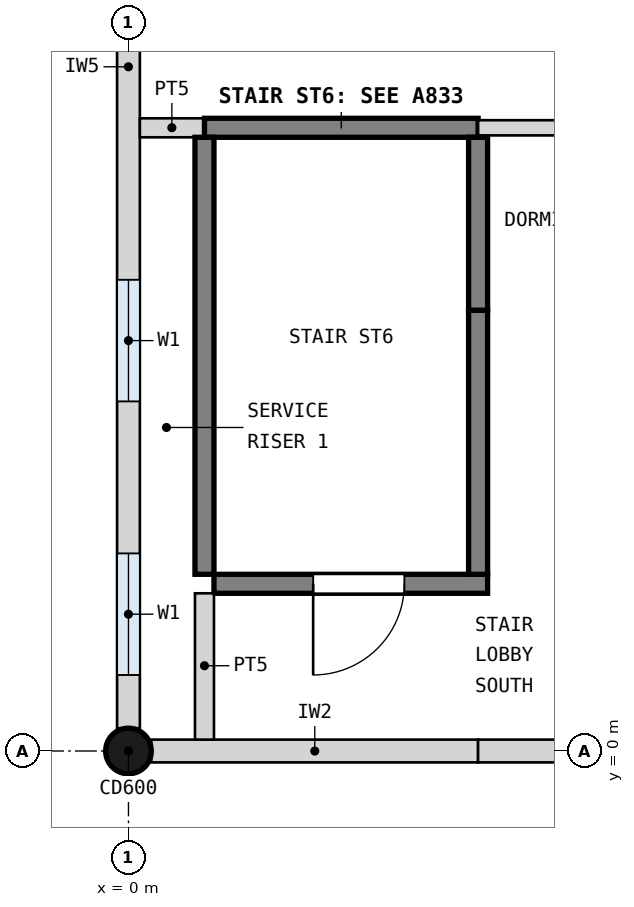
"""IFC4 building model, lengths in metres.
Left out: names, types, materials, properties, quantities, classifications, styles, units other than length and angle.
Written with IfcOpenShell. Run it as: python <this file> out.ifc"""

import sys

from ifc_helpers import new_model, si_unit, direction, frame, frame_2d, origin, origin_with_axes, origin_2d, place, context, subcontext, project, spatial, rectangle, circle, extrude, element, fill, save


model = new_model("IFC4")
c1 = context("Model", 3, precision=1e-05, world=origin(), true_north=direction((0.0, 1.0)))
c2 = subcontext(c1, "Body", "Model", "MODEL_VIEW")
j1 = project(units=[si_unit("LENGTHUNIT", "METRE"), si_unit("PLANEANGLEUNIT", "RADIAN")], contexts=[c1])
p1 = place(None, origin())
s1 = spatial("IfcSite", under=j1, at=p1, CompositionType="ELEMENT")
p2 = place(p1, origin())
s2 = spatial("IfcBuilding", under=s1, at=p2, CompositionType="ELEMENT")
p3 = place(p2, frame((0.0, 0.0, 4.2)))
s3 = spatial("IfcBuildingStorey", under=s2, at=p3, CompositionType="ELEMENT", Elevation=4.2)
p4 = place(p3, origin_with_axes())
e1 = element("IfcColumn", 1, at=p4, inside=s3, PredefinedType="COLUMN", context=c2, shape_type="SweptSolid", body=[
    extrude(circle(Radius=0.3, at=origin_2d()), origin(), (0.0, 0.0, 1.0), 4.2),
])
p5 = place(p3, frame((0.3, 0.0, 0.0), z_axis=(0.0, 0.0, 1.0), x_axis=(1.0, 0.0, 0.0)))
e2 = element("IfcWall", 2, at=p5, inside=s3, PredefinedType="SOLIDWALL", context=c2, shape_type="SweptSolid", body=[
    extrude(rectangle(XDim=4.3, YDim=0.3, at=frame_2d((2.15, 0.0))), origin(), (0.0, 0.0, 1.0), 3.0),
])
p6 = place(p3, frame((4.6, 0.0, 0.0), z_axis=(0.0, 0.0, 1.0), x_axis=(1.0, 0.0, 0.0)))
e3 = element("IfcWall", 3, at=p6, inside=s3, PredefinedType="SOLIDWALL", context=c2, shape_type="SweptSolid", body=[
    extrude(rectangle(XDim=7.9, YDim=0.3, at=frame_2d((3.95, 0.0))), origin(), (0.0, 0.0, 1.0), 3.0),
])
p7 = place(p6, frame((2.725, 0.0, 1.0)))
e4 = element("IfcOpeningElement", 4, at=p7, cuts=e3, PredefinedType="OPENING", context=c2, shape_type="SweptSolid", body=[
    extrude(rectangle(XDim=1.6, YDim=1.8, at=frame_2d((0.8, 0.9))), frame((0.0, 0.16, 0.0), z_axis=(0.0, -1.0, 0.0), x_axis=(1.0, 0.0, 0.0)), (0.0, 0.0, 1.0), 0.32),
])
p8 = place(p6, frame((5.5, 0.0, 1.0)))
e5 = element("IfcOpeningElement", 5, at=p8, cuts=e3, PredefinedType="OPENING", context=c2, shape_type="SweptSolid", body=[
    extrude(rectangle(XDim=1.6, YDim=1.8, at=frame_2d((0.8, 0.9))), frame((0.0, 0.16, 0.0), z_axis=(0.0, -1.0, 0.0), x_axis=(1.0, 0.0, 0.0)), (0.0, 0.0, 1.0), 0.32),
])
p9 = place(p3, frame((0.0, 0.3, 0.0), z_axis=(0.0, 0.0, 1.0), x_axis=(0.0, 1.0, 0.0)))
e6 = element("IfcWall", 6, at=p9, inside=s3, PredefinedType="SOLIDWALL", context=c2, shape_type="SweptSolid", body=[
    extrude(rectangle(XDim=13.8, YDim=0.3, at=frame_2d((6.9, 0.0))), origin(), (0.0, 0.0, 1.0), 2.9),
])
p10 = place(p9, frame((0.7, 0.0, 1.0)))
e7 = element("IfcOpeningElement", 7, at=p10, cuts=e6, PredefinedType="OPENING", context=c2, shape_type="SweptSolid", body=[
    extrude(rectangle(XDim=1.6, YDim=1.8, at=frame_2d((0.8, 0.9))), frame((0.0, 0.16, 0.0), z_axis=(0.0, -1.0, 0.0), x_axis=(1.0, 0.0, 0.0)), (0.0, 0.0, 1.0), 0.32),
])
p11 = place(p9, frame((4.3, 0.0, 1.0)))
e8 = element("IfcOpeningElement", 8, at=p11, cuts=e6, PredefinedType="OPENING", context=c2, shape_type="SweptSolid", body=[
    extrude(rectangle(XDim=1.6, YDim=1.8, at=frame_2d((0.8, 0.9))), frame((0.0, 0.16, 0.0), z_axis=(0.0, -1.0, 0.0), x_axis=(1.0, 0.0, 0.0)), (0.0, 0.0, 1.0), 0.32),
])
p12 = place(p9, frame((11.5, 0.0, 1.0)))
e9 = element("IfcOpeningElement", 9, at=p12, cuts=e6, PredefinedType="OPENING", context=c2, shape_type="SweptSolid", body=[
    extrude(rectangle(XDim=1.6, YDim=1.8, at=frame_2d((0.8, 0.9))), frame((0.0, 0.16, 0.0), z_axis=(0.0, -1.0, 0.0), x_axis=(1.0, 0.0, 0.0)), (0.0, 0.0, 1.0), 0.32),
])
p13 = place(p3, frame((1.125, 2.2, 0.0), z_axis=(0.0, 0.0, 1.0), x_axis=(1.0, 0.0, 0.0)))
e10 = element("IfcWall", 10, at=p13, inside=s3, PredefinedType="SHEAR", context=c2, shape_type="SweptSolid", body=[
    extrude(rectangle(XDim=3.6, YDim=0.25, at=frame_2d((1.8, 0.0))), origin(), (0.0, 0.0, 1.0), 3.9),
])
p14 = place(p13, frame((1.305, 0.0, 0.0)))
e11 = element("IfcOpeningElement", 11, at=p14, cuts=e10, PredefinedType="OPENING", context=c2, shape_type="SweptSolid", body=[
    extrude(rectangle(XDim=1.2, YDim=2.1, at=frame_2d((0.6, 1.05))), frame((0.0, 0.135, 0.0), z_axis=(0.0, -1.0, 0.0), x_axis=(1.0, 0.0, 0.0)), (0.0, 0.0, 1.0), 0.27),
])
p15 = place(p3, frame((0.15, 8.2, 0.0), z_axis=(0.0, 0.0, 1.0), x_axis=(1.0, 0.0, 0.0)))
e12 = element("IfcWall", 12, at=p15, inside=s3, PredefinedType="PARTITIONING", context=c2, shape_type="SweptSolid", body=[
    extrude(rectangle(XDim=0.85, YDim=0.25, at=frame_2d((0.425, 0.0))), origin(), (0.0, 0.0, 1.0), 3.9),
])
p16 = place(p3, frame((1.0, 8.2, 0.0), z_axis=(0.0, 0.0, 1.0), x_axis=(1.0, 0.0, 0.0)))
e13 = element("IfcWall", 13, at=p16, inside=s3, PredefinedType="SHEAR", context=c2, shape_type="SweptSolid", body=[
    extrude(rectangle(XDim=3.6, YDim=0.25, at=frame_2d((1.8, 0.0))), origin(), (0.0, 0.0, 1.0), 3.9),
])
p17 = place(p3, frame((4.6, 8.2, 0.0), z_axis=(0.0, 0.0, 1.0), x_axis=(1.0, 0.0, 0.0)))
e14 = element("IfcWall", 14, at=p17, inside=s3, PredefinedType="PARTITIONING", context=c2, shape_type="SweptSolid", body=[
    extrude(rectangle(XDim=7.6, YDim=0.2, at=frame_2d((3.8, 0.0))), origin(), (0.0, 0.0, 1.0), 3.9),
])
p18 = place(p17, frame((3.5, 0.0, 0.0)))
e15 = element("IfcOpeningElement", 15, at=p18, cuts=e14, PredefinedType="OPENING", context=c2, shape_type="SweptSolid", body=[
    extrude(rectangle(XDim=1.8, YDim=2.1, at=frame_2d((0.9, 1.05))), frame((0.0, 0.11, 0.0), z_axis=(0.0, -1.0, 0.0), x_axis=(1.0, 0.0, 0.0)), (0.0, 0.0, 1.0), 0.22),
])
p19 = place(p3, frame((1.0, 0.15, 0.0), z_axis=(0.0, 0.0, 1.0), x_axis=(0.0, 1.0, 0.0)))
e16 = element("IfcWall", 16, at=p19, inside=s3, PredefinedType="PARTITIONING", context=c2, shape_type="SweptSolid", body=[
    extrude(rectangle(XDim=1.925, YDim=0.25, at=frame_2d((0.962, 0.0))), origin(), (0.0, 0.0, 1.0), 3.9),
])
p20 = place(p3, frame((1.0, 2.325, 0.0), z_axis=(0.0, 0.0, 1.0), x_axis=(0.0, 1.0, 0.0)))
e17 = element("IfcWall", 17, at=p20, inside=s3, PredefinedType="SHEAR", context=c2, shape_type="SweptSolid", body=[
    extrude(rectangle(XDim=5.75, YDim=0.25, at=frame_2d((2.875, 0.0))), origin(), (0.0, 0.0, 1.0), 3.9),
])
p21 = place(p3, frame((4.6, 2.325, 0.0), z_axis=(0.0, 0.0, 1.0), x_axis=(0.0, 1.0, 0.0)))
e18 = element("IfcWall", 18, at=p21, inside=s3, PredefinedType="SHEAR", context=c2, shape_type="SweptSolid", body=[
    extrude(rectangle(XDim=3.475, YDim=0.25, at=frame_2d((1.738, 0.0))), origin(), (0.0, 0.0, 1.0), 3.9),
])
p22 = place(p3, frame((4.6, 5.8, 0.0), z_axis=(0.0, 0.0, 1.0), x_axis=(0.0, 1.0, 0.0)))
e19 = element("IfcWall", 19, at=p22, inside=s3, PredefinedType="SHEAR", context=c2, shape_type="SweptSolid", body=[
    extrude(rectangle(XDim=2.275, YDim=0.25, at=frame_2d((1.137, 0.0))), origin(), (0.0, 0.0, 1.0), 3.9),
])
p23 = place(p14, frame((1.2, 0.0, 0.0), z_axis=(0.0, 0.0, 1.0), x_axis=(-1.0, 0.0, 0.0)))
e20 = element("IfcDoor", 20, at=p23, inside=s3, OperationType="SINGLE_SWING_RIGHT", PredefinedType="DOOR", context=c2, shape_type="SweptSolid", body=[
    extrude(rectangle(XDim=1.2, YDim=2.1, at=frame_2d((0.6, 1.05))), frame((0.0, 0.025, 0.0), z_axis=(0.0, -1.0, 0.0), x_axis=(1.0, 0.0, 0.0)), (0.0, 0.0, 1.0), 0.05),
])
fill(e11, e20)
p24 = place(p10, origin())
e21 = element("IfcWindow", 21, at=p24, inside=s3, PartitioningType="SINGLE_PANEL", PredefinedType="WINDOW", context=c2, shape_type="SweptSolid", body=[
    extrude(rectangle(XDim=1.6, YDim=1.8, at=frame_2d((0.8, 0.9))), frame((0.0, 0.03, 0.0), z_axis=(0.0, -1.0, 0.0), x_axis=(1.0, 0.0, 0.0)), (0.0, 0.0, 1.0), 0.06),
])
fill(e7, e21)
p25 = place(p11, origin())
e22 = element("IfcWindow", 22, at=p25, inside=s3, PartitioningType="SINGLE_PANEL", PredefinedType="WINDOW", context=c2, shape_type="SweptSolid", body=[
    extrude(rectangle(XDim=1.6, YDim=1.8, at=frame_2d((0.8, 0.9))), frame((0.0, 0.03, 0.0), z_axis=(0.0, -1.0, 0.0), x_axis=(1.0, 0.0, 0.0)), (0.0, 0.0, 1.0), 0.06),
])
fill(e8, e22)
save(model, sys.argv[1])
